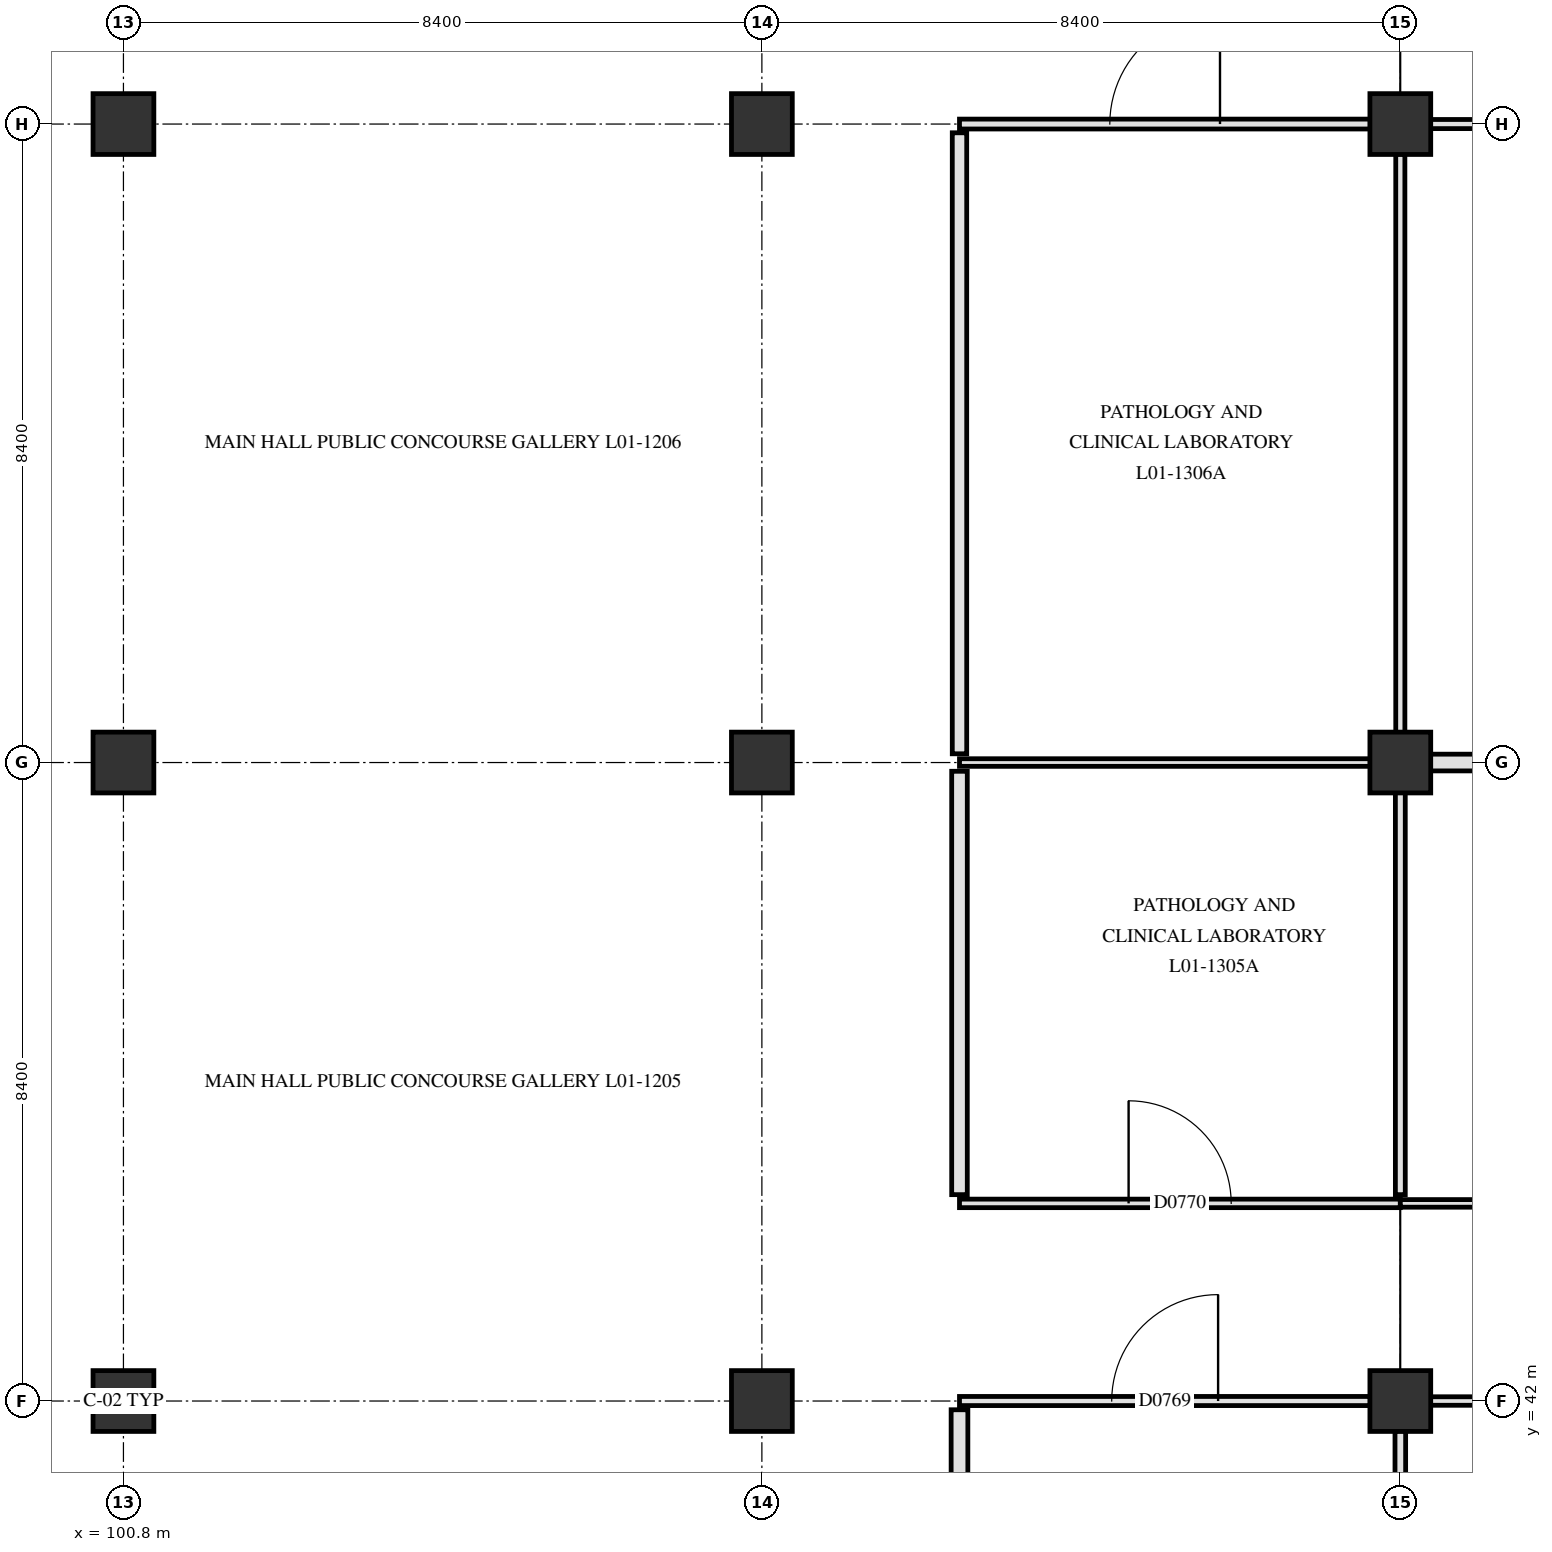
"""IFC4 building model, lengths in metres.
Left out: names, types, materials, properties, quantities, classifications, styles, units other than length and angle.
Written with IfcOpenShell. Run it as: python <this file> out.ifc"""

import sys

from ifc_helpers import new_model, si_unit, direction, frame, frame_2d, origin, origin_2d, place, context, subcontext, project, spatial, rectangle, circle, extrude, element, fill, save


model = new_model("IFC4")
c1 = context("Model", 3, precision=1e-05, world=origin(), true_north=direction((0.0, 1.0)))
c2 = subcontext(c1, "Body", "Model", "MODEL_VIEW")
j1 = project(units=[si_unit("LENGTHUNIT", "METRE"), si_unit("PLANEANGLEUNIT", "RADIAN")], contexts=[c1])
p1 = place(None, origin())
s1 = spatial("IfcSite", under=j1, at=p1, CompositionType="ELEMENT")
p2 = place(p1, origin())
s2 = spatial("IfcBuilding", under=s1, at=p2, CompositionType="ELEMENT")
p3 = place(p2, frame((0.0, 0.0, 4.8)))
s3 = spatial("IfcBuildingStorey", under=s2, at=p3, CompositionType="ELEMENT", Elevation=4.8)
for number, where, z_axis, x_axis in (
    (1, (100.8, 42.0, 0.0), (0.0, 0.0, 1.0), (1.0, 0.0, 0.0)),
    (2, (100.8, 50.4, 0.0), (0.0, 0.0, 1.0), (1.0, 0.0, 0.0)),
    (3, (100.8, 58.8, 0.0), (0.0, 0.0, 1.0), (1.0, 0.0, 0.0)),
    (4, (109.2, 42.0, 0.0), (0.0, 0.0, 1.0), (1.0, 0.0, 0.0)),
    (5, (109.2, 50.4, 0.0), (0.0, 0.0, 1.0), (1.0, 0.0, 0.0)),
):
    element("IfcColumn", number, at=place(p3, frame(where, z_axis=z_axis, x_axis=x_axis)), inside=s3, PredefinedType="COLUMN", context=c2, shape_type="SweptSolid", body=[
        extrude(rectangle(XDim=0.8, YDim=0.8, at=origin_2d()), origin(), (0.0, 0.0, 1.0), 4.5),
    ])
p4 = place(p3, frame((109.2, 58.8, 0.0), z_axis=(0.0, 0.0, 1.0), x_axis=(1.0, 0.0, 0.0)))
e6 = element("IfcColumn", 6, at=p4, inside=s3, PredefinedType="COLUMN", context=c2, shape_type="SweptSolid", body=[
    extrude(circle(Radius=0.4, at=origin_2d()), origin(), (0.0, 0.0, 1.0), 4.5),
])
for number, where, z_axis, x_axis in (
    (7, (117.6, 42.0, 0.0), (0.0, 0.0, 1.0), (1.0, 0.0, 0.0)),
    (8, (117.6, 50.4, 0.0), (0.0, 0.0, 1.0), (1.0, 0.0, 0.0)),
):
    element("IfcColumn", number, at=place(p3, frame(where, z_axis=z_axis, x_axis=x_axis)), inside=s3, PredefinedType="COLUMN", context=c2, shape_type="SweptSolid", body=[
        extrude(rectangle(XDim=0.8, YDim=0.8, at=origin_2d()), origin(), (0.0, 0.0, 1.0), 4.5),
    ])
p5 = place(p3, frame((117.6, 58.8, 0.0), z_axis=(0.0, 0.0, 1.0), x_axis=(1.0, 0.0, 0.0)))
e9 = element("IfcColumn", 9, at=p5, inside=s3, PredefinedType="COLUMN", context=c2, shape_type="SweptSolid", body=[
    extrude(circle(Radius=0.4, at=origin_2d()), origin(), (0.0, 0.0, 1.0), 4.5),
])
p6 = place(p3, frame((111.8, 42.0, 0.0), z_axis=(0.0, 0.0, 1.0), x_axis=(1.0, 0.0, 0.0)))
e10 = element("IfcWall", 10, at=p6, inside=s3, PredefinedType="PARTITIONING", context=c2, shape_type="SweptSolid", body=[
    extrude(rectangle(XDim=5.405, YDim=0.12, at=frame_2d((2.703, 0.0))), origin(), (0.0, 0.0, 1.0), 3.54),
])
p7 = place(p6, frame((2.002, 0.0, 0.0)))
e11 = element("IfcOpeningElement", 11, at=p7, cuts=e10, PredefinedType="OPENING", context=c2, shape_type="SweptSolid", body=[
    extrude(rectangle(XDim=1.4, YDim=2.2, at=frame_2d((0.7, 1.1))), frame((0.0, 0.07, 0.0), z_axis=(0.0, -1.0, 0.0), x_axis=(1.0, 0.0, 0.0)), (0.0, 0.0, 1.0), 0.14),
])
p8 = place(p3, frame((117.995, 42.0, 0.0), z_axis=(0.0, 0.0, 1.0), x_axis=(1.0, 0.0, 0.0)))
e12 = element("IfcWall", 12, at=p8, inside=s3, PredefinedType="PARTITIONING", context=c2, shape_type="SweptSolid", body=[
    extrude(rectangle(XDim=7.71, YDim=0.112, at=frame_2d((3.855, 0.0))), origin(), (0.0, 0.0, 1.0), 3.54),
])
p9 = place(p8, frame((3.085, 0.0, 0.0)))
e13 = element("IfcOpeningElement", 13, at=p9, cuts=e12, PredefinedType="OPENING", context=c2, shape_type="SweptSolid", body=[
    extrude(rectangle(XDim=1.54, YDim=2.24, at=frame_2d((0.77, 1.12))), frame((0.0, 0.066, 0.0), z_axis=(0.0, -1.0, 0.0), x_axis=(1.0, 0.0, 0.0)), (0.0, 0.0, 1.0), 0.132),
])
p10 = place(p3, frame((111.8, 44.6, 0.0), z_axis=(0.0, 0.0, 1.0), x_axis=(1.0, 0.0, 0.0)))
e14 = element("IfcWall", 14, at=p10, inside=s3, PredefinedType="PARTITIONING", context=c2, shape_type="SweptSolid", body=[
    extrude(rectangle(XDim=5.8, YDim=0.112, at=frame_2d((2.9, 0.0))), origin(), (0.0, 0.0, 1.0), 3.59),
])
p11 = place(p10, frame((2.225, 0.0, 0.0)))
e15 = element("IfcOpeningElement", 15, at=p11, cuts=e14, PredefinedType="OPENING", context=c2, shape_type="SweptSolid", body=[
    extrude(rectangle(XDim=1.35, YDim=2.2, at=frame_2d((0.675, 1.1))), frame((0.0, 0.066, 0.0), z_axis=(0.0, -1.0, 0.0), x_axis=(1.0, 0.0, 0.0)), (0.0, 0.0, 1.0), 0.132),
])
p12 = place(p3, frame((117.6, 44.6, 0.0), z_axis=(0.0, 0.0, 1.0), x_axis=(1.0, 0.0, 0.0)))
e16 = element("IfcWall", 16, at=p12, inside=s3, PredefinedType="PARTITIONING", context=c2, shape_type="SweptSolid", body=[
    extrude(rectangle(XDim=8.12, YDim=0.1, at=frame_2d((4.06, 0.0))), origin(), (0.0, 0.0, 1.0), 3.59),
])
p13 = place(p12, frame((3.24, 0.0, 0.0)))
e17 = element("IfcOpeningElement", 17, at=p13, cuts=e16, PredefinedType="OPENING", context=c2, shape_type="SweptSolid", body=[
    extrude(rectangle(XDim=1.64, YDim=2.28, at=frame_2d((0.82, 1.14))), frame((0.0, 0.06, 0.0), z_axis=(0.0, -1.0, 0.0), x_axis=(1.0, 0.0, 0.0)), (0.0, 0.0, 1.0), 0.12),
])
p14 = place(p3, frame((111.8, 50.4, 0.0), z_axis=(0.0, 0.0, 1.0), x_axis=(1.0, 0.0, 0.0)))
e18 = element("IfcWall", 18, at=p14, inside=s3, PredefinedType="PARTITIONING", context=c2, shape_type="SweptSolid", body=[
    extrude(rectangle(XDim=5.405, YDim=0.1, at=frame_2d((2.703, 0.0))), origin(), (0.0, 0.0, 1.0), 3.54),
])
p15 = place(p3, frame((117.995, 50.4, 0.0), z_axis=(0.0, 0.0, 1.0), x_axis=(1.0, 0.0, 0.0)))
e19 = element("IfcWall", 19, at=p15, inside=s3, PredefinedType="PARTITIONING", context=c2, shape_type="SweptSolid", body=[
    extrude(rectangle(XDim=7.71, YDim=0.22, at=frame_2d((3.855, 0.0))), origin(), (0.0, 0.0, 1.0), 3.54),
])
p16 = place(p3, frame((111.8, 58.8, 0.0), z_axis=(0.0, 0.0, 1.0), x_axis=(1.0, 0.0, 0.0)))
e20 = element("IfcWall", 20, at=p16, inside=s3, PredefinedType="PARTITIONING", context=c2, shape_type="SweptSolid", body=[
    extrude(rectangle(XDim=5.405, YDim=0.13, at=frame_2d((2.703, 0.0))), origin(), (0.0, 0.0, 1.0), 3.54),
])
p17 = place(p16, frame((1.978, 0.0, 0.0)))
e21 = element("IfcOpeningElement", 21, at=p17, cuts=e20, PredefinedType="OPENING", context=c2, shape_type="SweptSolid", body=[
    extrude(rectangle(XDim=1.45, YDim=2.2, at=frame_2d((0.725, 1.1))), frame((0.0, 0.075, 0.0), z_axis=(0.0, -1.0, 0.0), x_axis=(1.0, 0.0, 0.0)), (0.0, 0.0, 1.0), 0.15),
])
p18 = place(p3, frame((117.995, 58.8, 0.0), z_axis=(0.0, 0.0, 1.0), x_axis=(1.0, 0.0, 0.0)))
e22 = element("IfcWall", 22, at=p18, inside=s3, PredefinedType="PARTITIONING", context=c2, shape_type="SweptSolid", body=[
    extrude(rectangle(XDim=7.61, YDim=0.12, at=frame_2d((3.805, 0.0))), origin(), (0.0, 0.0, 1.0), 3.54),
])
p19 = place(p18, frame((2.935, 0.0, 0.0)))
e23 = element("IfcOpeningElement", 23, at=p19, cuts=e22, PredefinedType="OPENING", context=c2, shape_type="SweptSolid", body=[
    extrude(rectangle(XDim=1.74, YDim=2.24, at=frame_2d((0.87, 1.12))), frame((0.0, 0.07, 0.0), z_axis=(0.0, -1.0, 0.0), x_axis=(1.0, 0.0, 0.0)), (0.0, 0.0, 1.0), 0.14),
])
p20 = place(p3, frame((111.8, 33.715, 0.0), z_axis=(0.0, 0.0, 1.0), x_axis=(0.0, 1.0, 0.0)))
e24 = element("IfcWall", 24, at=p20, inside=s3, PredefinedType="PARTITIONING", context=c2, shape_type="SweptSolid", body=[
    extrude(rectangle(XDim=8.17, YDim=0.22, at=frame_2d((4.085, 0.0))), origin(), (0.0, 0.0, 1.0), 3.54),
])
p21 = place(p3, frame((111.8, 44.715, 0.0), z_axis=(0.0, 0.0, 1.0), x_axis=(0.0, 1.0, 0.0)))
e25 = element("IfcWall", 25, at=p21, inside=s3, PredefinedType="PARTITIONING", context=c2, shape_type="SweptSolid", body=[
    extrude(rectangle(XDim=5.57, YDim=0.205, at=frame_2d((2.785, 0.0))), origin(), (0.0, 0.0, 1.0), 3.54),
])
p22 = place(p3, frame((111.8, 50.515, 0.0), z_axis=(0.0, 0.0, 1.0), x_axis=(0.0, 1.0, 0.0)))
e26 = element("IfcWall", 26, at=p22, inside=s3, PredefinedType="PARTITIONING", context=c2, shape_type="SweptSolid", body=[
    extrude(rectangle(XDim=8.17, YDim=0.19, at=frame_2d((4.085, 0.0))), origin(), (0.0, 0.0, 1.0), 3.54),
])
p23 = place(p3, frame((117.6, 33.995, 0.0), z_axis=(0.0, 0.0, 1.0), x_axis=(0.0, 1.0, 0.0)))
e27 = element("IfcWall", 27, at=p23, inside=s3, PredefinedType="PARTITIONING", context=c2, shape_type="SweptSolid", body=[
    extrude(rectangle(XDim=7.61, YDim=0.14, at=frame_2d((3.805, 0.0))), origin(), (0.0, 0.0, 1.0), 3.59),
])
p24 = place(p3, frame((117.6, 44.715, 0.0), z_axis=(0.0, 0.0, 1.0), x_axis=(0.0, 1.0, 0.0)))
e28 = element("IfcWall", 28, at=p24, inside=s3, PredefinedType="PARTITIONING", context=c2, shape_type="SweptSolid", body=[
    extrude(rectangle(XDim=5.29, YDim=0.13, at=frame_2d((2.645, 0.0))), origin(), (0.0, 0.0, 1.0), 3.59),
])
p25 = place(p3, frame((117.6, 50.795, 0.0), z_axis=(0.0, 0.0, 1.0), x_axis=(0.0, 1.0, 0.0)))
e29 = element("IfcWall", 29, at=p25, inside=s3, PredefinedType="PARTITIONING", context=c2, shape_type="SweptSolid", body=[
    extrude(rectangle(XDim=7.61, YDim=0.12, at=frame_2d((3.805, 0.0))), origin(), (0.0, 0.0, 1.0), 3.59),
])
p26 = place(p7, origin())
e30 = element("IfcDoor", 30, at=p26, inside=s3, OperationType="SINGLE_SWING_RIGHT", PredefinedType="DOOR", context=c2, shape_type="SweptSolid", body=[
    extrude(rectangle(XDim=1.4, YDim=2.2, at=frame_2d((0.7, 1.1))), frame((0.0, 0.025, 0.0), z_axis=(0.0, -1.0, 0.0), x_axis=(1.0, 0.0, 0.0)), (0.0, 0.0, 1.0), 0.05),
])
fill(e11, e30)
p27 = place(p11, origin())
e31 = element("IfcDoor", 31, at=p27, inside=s3, OperationType="SINGLE_SWING_LEFT", PredefinedType="DOOR", context=c2, shape_type="SweptSolid", body=[
    extrude(rectangle(XDim=1.35, YDim=2.2, at=frame_2d((0.675, 1.1))), frame((0.0, 0.025, 0.0), z_axis=(0.0, -1.0, 0.0), x_axis=(1.0, 0.0, 0.0)), (0.0, 0.0, 1.0), 0.05),
])
fill(e15, e31)
p28 = place(p17, origin())
e32 = element("IfcDoor", 32, at=p28, inside=s3, OperationType="SINGLE_SWING_RIGHT", PredefinedType="DOOR", context=c2, shape_type="SweptSolid", body=[
    extrude(rectangle(XDim=1.45, YDim=2.2, at=frame_2d((0.725, 1.1))), frame((0.0, 0.025, 0.0), z_axis=(0.0, -1.0, 0.0), x_axis=(1.0, 0.0, 0.0)), (0.0, 0.0, 1.0), 0.05),
])
fill(e21, e32)
save(model, sys.argv[1])
